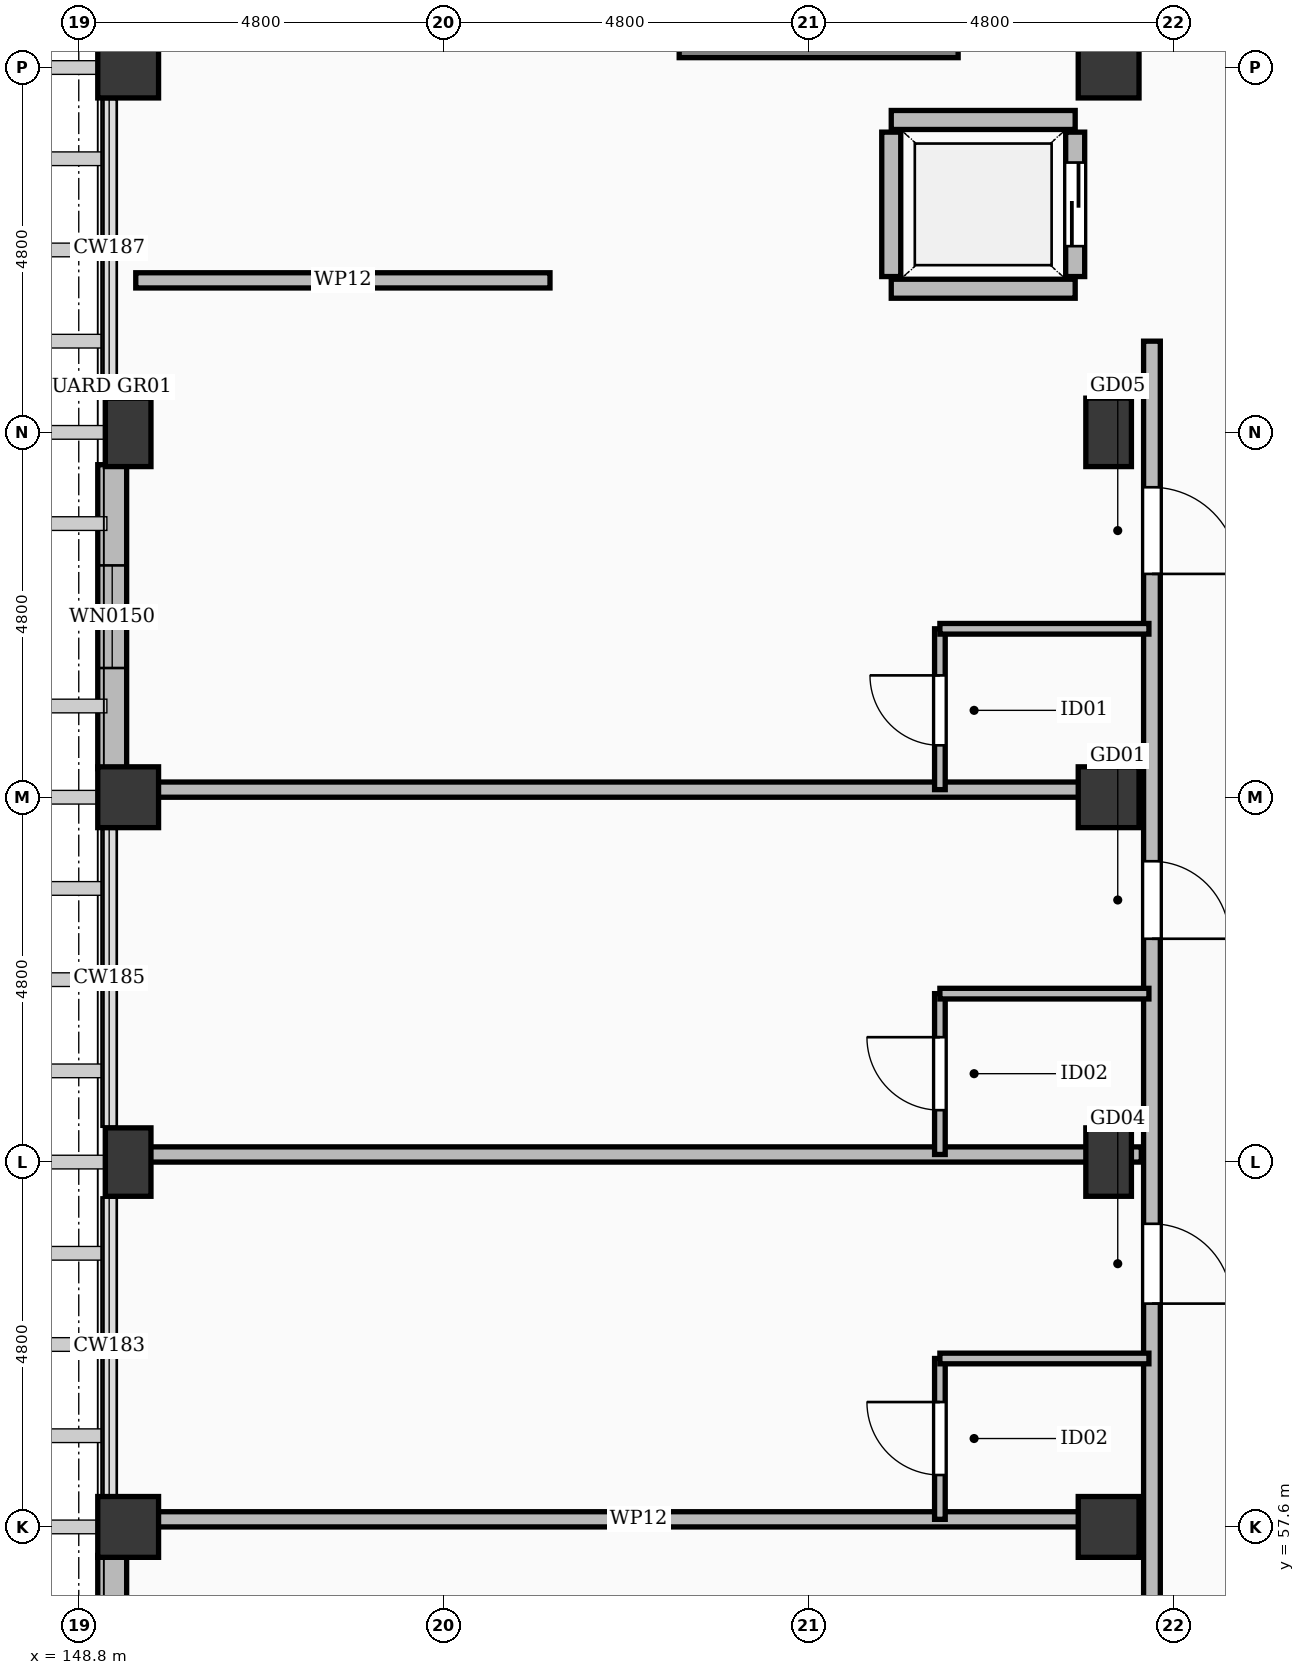
"""IFC4 building model, lengths in metres.
Left out: names, types, materials, properties, quantities, classifications, styles, units other than length and angle.
Written with IfcOpenShell. Run it as: python <this file> out.ifc"""

import sys

from ifc_helpers import new_model, si_unit, direction, frame, frame_2d, origin, origin_2d, place, context, subcontext, project, spatial, rectangle, extrude, element, fill, save


model = new_model("IFC4")
c1 = context("Model", 3, precision=1e-05, world=origin(), true_north=direction((0.0, 1.0)))
c2 = subcontext(c1, "Body", "Model", "MODEL_VIEW")
j1 = project(units=[si_unit("LENGTHUNIT", "METRE"), si_unit("PLANEANGLEUNIT", "RADIAN")], contexts=[c1])
p1 = place(None, origin())
s1 = spatial("IfcSite", under=j1, at=p1, CompositionType="ELEMENT")
p2 = place(p1, origin())
s2 = spatial("IfcBuilding", under=s1, at=p2, CompositionType="ELEMENT")
p3 = place(p2, frame((0.0, 0.0, 21.0)))
s3 = spatial("IfcBuildingStorey", under=s2, at=p3, CompositionType="ELEMENT", Elevation=21.0)
for number, where, z_axis, x_axis in (
    (1, (149.45, 57.6, 0.0), (0.0, 0.0, 1.0), (1.0, 0.0, 0.0)),
    (2, (149.45, 67.2, 0.0), (0.0, 0.0, 1.0), (1.0, 0.0, 0.0)),
    (3, (149.45, 76.8, 0.0), (0.0, 0.0, 1.0), (1.0, 0.0, 0.0)),
    (4, (162.35, 57.6, 0.0), (0.0, 0.0, 1.0), (1.0, 0.0, 0.0)),
    (5, (162.35, 67.2, 0.0), (0.0, 0.0, 1.0), (1.0, 0.0, 0.0)),
    (6, (162.35, 76.8, 0.0), (0.0, 0.0, 1.0), (1.0, 0.0, 0.0)),
):
    element("IfcColumn", number, at=place(p3, frame(where, z_axis=z_axis, x_axis=x_axis)), inside=s3, PredefinedType="COLUMN", context=c2, shape_type="SweptSolid", body=[
        extrude(rectangle(XDim=0.8, YDim=0.8, at=origin_2d()), origin(), (0.0, 0.0, 1.0), 3.6),
    ])
for number, where, z_axis, x_axis in (
    (7, (149.45, 62.4, -0.26), (0.0, 0.0, 1.0), (1.0, 0.0, 0.0)),
    (8, (149.45, 72.0, -0.26), (0.0, 0.0, 1.0), (1.0, 0.0, 0.0)),
    (9, (162.35, 62.4, -0.26), (0.0, 0.0, 1.0), (1.0, 0.0, 0.0)),
    (10, (162.35, 72.0, -0.26), (0.0, 0.0, 1.0), (1.0, 0.0, 0.0)),
):
    element("IfcColumn", number, at=place(p3, frame(where, z_axis=z_axis, x_axis=x_axis)), inside=s3, PredefinedType="COLUMN", context=c2, shape_type="SweptSolid", body=[
        extrude(rectangle(XDim=0.6, YDim=0.9, at=origin_2d()), origin(), (0.0, 0.0, 1.0), 3.86),
    ])
p4 = place(p3, frame((149.24, 53.225, 0.0), z_axis=(0.0, 0.0, 1.0), x_axis=(0.0, 1.0, 0.0)))
e11 = element("IfcWall", 11, at=p4, inside=s3, PredefinedType="SOLIDWALL", context=c2, shape_type="SweptSolid", body=[
    extrude(rectangle(XDim=4.0, YDim=0.38, at=frame_2d((2.0, 0.0))), origin(), (0.0, 0.0, 1.0), 2.652),
])
p5 = place(p4, frame((1.1, 0.0, 0.55)))
e12 = element("IfcOpeningElement", 12, at=p5, cuts=e11, PredefinedType="OPENING", context=c2, shape_type="SweptSolid", body=[
    extrude(rectangle(XDim=1.8, YDim=1.76, at=frame_2d((0.9, 0.88))), frame((0.0, 0.202, 0.0), z_axis=(0.0, -1.0, 0.0), x_axis=(1.0, 0.0, 0.0)), (0.0, 0.0, 1.0), 0.404),
])
p6 = place(p3, frame((149.24, 67.575, 0.0), z_axis=(0.0, 0.0, 1.0), x_axis=(0.0, 1.0, 0.0)))
e13 = element("IfcWall", 13, at=p6, inside=s3, PredefinedType="SOLIDWALL", context=c2, shape_type="SweptSolid", body=[
    extrude(rectangle(XDim=4.0, YDim=0.38, at=frame_2d((2.0, 0.0))), origin(), (0.0, 0.0, 1.0), 2.652),
])
p7 = place(p6, frame((1.325, 0.0, 0.55)))
e14 = element("IfcOpeningElement", 14, at=p7, cuts=e13, PredefinedType="OPENING", context=c2, shape_type="SweptSolid", body=[
    extrude(rectangle(XDim=1.35, YDim=1.73, at=frame_2d((0.675, 0.865))), frame((0.0, 0.202, 0.0), z_axis=(0.0, -1.0, 0.0), x_axis=(1.0, 0.0, 0.0)), (0.0, 0.0, 1.0), 0.404),
])
p8 = place(p3, frame((156.7, 77.18, 0.0), z_axis=(0.0, 0.0, 1.0), x_axis=(1.0, 0.0, 0.0)))
e15 = element("IfcWall", 15, at=p8, inside=s3, PredefinedType="SHEAR", context=c2, shape_type="SweptSolid", body=[
    extrude(rectangle(XDim=3.67, YDim=0.5, at=frame_2d((1.835, 0.0))), origin(), (0.0, 0.0, 1.0), 3.34),
])
for number, where, z_axis, x_axis in (
    (16, (159.49, 73.89, 0.0), (0.0, 0.0, 1.0), (1.0, 0.0, 0.0)),
    (17, (159.49, 76.11, 0.0), (0.0, 0.0, 1.0), (1.0, 0.0, 0.0)),
):
    element("IfcWall", number, at=place(p3, frame(where, z_axis=z_axis, x_axis=x_axis)), inside=s3, PredefinedType="SOLIDWALL", context=c2, shape_type="SweptSolid", body=[
        extrude(rectangle(XDim=2.42, YDim=0.25, at=frame_2d((1.21, 0.0))), origin(), (0.0, 0.0, 1.0), 3.34),
    ])
p9 = place(p3, frame((159.49, 74.05, 0.0), z_axis=(0.0, 0.0, 1.0), x_axis=(0.0, 1.0, 0.0)))
e18 = element("IfcWall", 18, at=p9, inside=s3, PredefinedType="SOLIDWALL", context=c2, shape_type="SweptSolid", body=[
    extrude(rectangle(XDim=1.9, YDim=0.25, at=frame_2d((0.95, 0.0))), origin(), (0.0, 0.0, 1.0), 3.34),
])
p10 = place(p3, frame((161.91, 74.05, 0.0), z_axis=(0.0, 0.0, 1.0), x_axis=(0.0, 1.0, 0.0)))
e19 = element("IfcWall", 19, at=p10, inside=s3, PredefinedType="SOLIDWALL", context=c2, shape_type="SweptSolid", body=[
    extrude(rectangle(XDim=1.9, YDim=0.25, at=frame_2d((0.95, 0.0))), origin(), (0.0, 0.0, 1.0), 3.34),
])
p11 = place(p10, frame((0.4, 0.0, 0.0)))
e20 = element("IfcOpeningElement", 20, at=p11, cuts=e19, PredefinedType="OPENING", context=c2, shape_type="SweptSolid", body=[
    extrude(rectangle(XDim=1.1, YDim=2.2, at=frame_2d((0.55, 1.1))), frame((0.0, 0.137, 0.0), z_axis=(0.0, -1.0, 0.0), x_axis=(1.0, 0.0, 0.0)), (0.0, 0.0, 1.0), 0.274),
])
p12 = place(p3, frame((162.92, 19.55, 0.0), z_axis=(0.0, 0.0, 1.0), x_axis=(0.0, 1.0, 0.0)))
e21 = element("IfcWall", 21, at=p12, inside=s3, PredefinedType="PARTITIONING", context=c2, shape_type="SweptSolid", body=[
    extrude(rectangle(XDim=53.65, YDim=0.22, at=frame_2d((26.825, 0.0))), origin(), (0.0, 0.0, 1.0), 2.652),
])
p13 = place(p12, frame((5.15, 0.0, 0.0)))
e22 = element("IfcOpeningElement", 22, at=p13, cuts=e21, PredefinedType="OPENING", context=c2, shape_type="SweptSolid", body=[
    extrude(rectangle(XDim=1.5, YDim=2.3, at=frame_2d((0.75, 1.15))), frame((0.0, 0.122, 0.0), z_axis=(0.0, -1.0, 0.0), x_axis=(1.0, 0.0, 0.0)), (0.0, 0.0, 1.0), 0.244),
])
p14 = place(p12, frame((12.188, 0.0, 0.0)))
e23 = element("IfcOpeningElement", 23, at=p14, cuts=e21, PredefinedType="OPENING", context=c2, shape_type="SweptSolid", body=[
    extrude(rectangle(XDim=1.05, YDim=2.22, at=frame_2d((0.525, 1.11))), frame((0.0, 0.122, 0.0), z_axis=(0.0, -1.0, 0.0), x_axis=(1.0, 0.0, 0.0)), (0.0, 0.0, 1.0), 0.244),
])
p15 = place(p12, frame((16.988, 0.0, 0.0)))
e24 = element("IfcOpeningElement", 24, at=p15, cuts=e21, PredefinedType="OPENING", context=c2, shape_type="SweptSolid", body=[
    extrude(rectangle(XDim=1.02, YDim=2.2, at=frame_2d((0.51, 1.1))), frame((0.0, 0.122, 0.0), z_axis=(0.0, -1.0, 0.0), x_axis=(1.0, 0.0, 0.0)), (0.0, 0.0, 1.0), 0.244),
])
p16 = place(p12, frame((21.788, 0.0, 0.0)))
e25 = element("IfcOpeningElement", 25, at=p16, cuts=e21, PredefinedType="OPENING", context=c2, shape_type="SweptSolid", body=[
    extrude(rectangle(XDim=1.14, YDim=2.26, at=frame_2d((0.57, 1.13))), frame((0.0, 0.122, 0.0), z_axis=(0.0, -1.0, 0.0), x_axis=(1.0, 0.0, 0.0)), (0.0, 0.0, 1.0), 0.244),
])
p17 = place(p12, frame((26.588, 0.0, 0.0)))
e26 = element("IfcOpeningElement", 26, at=p17, cuts=e21, PredefinedType="OPENING", context=c2, shape_type="SweptSolid", body=[
    extrude(rectangle(XDim=0.98, YDim=2.15, at=frame_2d((0.49, 1.075))), frame((0.0, 0.122, 0.0), z_axis=(0.0, -1.0, 0.0), x_axis=(1.0, 0.0, 0.0)), (0.0, 0.0, 1.0), 0.244),
])
p18 = place(p12, frame((31.038, 0.0, 0.0)))
e27 = element("IfcOpeningElement", 27, at=p18, cuts=e21, PredefinedType="OPENING", context=c2, shape_type="SweptSolid", body=[
    extrude(rectangle(XDim=1.28, YDim=2.16, at=frame_2d((0.64, 1.08))), frame((0.0, 0.122, 0.0), z_axis=(0.0, -1.0, 0.0), x_axis=(1.0, 0.0, 0.0)), (0.0, 0.0, 1.0), 0.244),
])
p19 = place(p12, frame((36.188, 0.0, 0.0)))
e28 = element("IfcOpeningElement", 28, at=p19, cuts=e21, PredefinedType="OPENING", context=c2, shape_type="SweptSolid", body=[
    extrude(rectangle(XDim=0.9, YDim=2.08, at=frame_2d((0.45, 1.04))), frame((0.0, 0.122, 0.0), z_axis=(0.0, -1.0, 0.0), x_axis=(1.0, 0.0, 0.0)), (0.0, 0.0, 1.0), 0.244),
])
p20 = place(p12, frame((40.988, 0.0, 0.0)))
e29 = element("IfcOpeningElement", 29, at=p20, cuts=e21, PredefinedType="OPENING", context=c2, shape_type="SweptSolid", body=[
    extrude(rectangle(XDim=1.05, YDim=2.22, at=frame_2d((0.525, 1.11))), frame((0.0, 0.122, 0.0), z_axis=(0.0, -1.0, 0.0), x_axis=(1.0, 0.0, 0.0)), (0.0, 0.0, 1.0), 0.244),
])
p21 = place(p12, frame((45.788, 0.0, 0.0)))
e30 = element("IfcOpeningElement", 30, at=p21, cuts=e21, PredefinedType="OPENING", context=c2, shape_type="SweptSolid", body=[
    extrude(rectangle(XDim=1.02, YDim=2.2, at=frame_2d((0.51, 1.1))), frame((0.0, 0.122, 0.0), z_axis=(0.0, -1.0, 0.0), x_axis=(1.0, 0.0, 0.0)), (0.0, 0.0, 1.0), 0.244),
])
p22 = place(p12, frame((50.588, 0.0, 0.0)))
e31 = element("IfcOpeningElement", 31, at=p22, cuts=e21, PredefinedType="OPENING", context=c2, shape_type="SweptSolid", body=[
    extrude(rectangle(XDim=1.14, YDim=2.26, at=frame_2d((0.57, 1.13))), frame((0.0, 0.122, 0.0), z_axis=(0.0, -1.0, 0.0), x_axis=(1.0, 0.0, 0.0)), (0.0, 0.0, 1.0), 0.244),
])
p23 = place(p3, frame((149.55, 74.0, 0.0), z_axis=(0.0, 0.0, 1.0), x_axis=(1.0, 0.0, 0.0)))
e32 = element("IfcWall", 32, at=p23, inside=s3, PredefinedType="PARTITIONING", context=c2, shape_type="SweptSolid", body=[
    extrude(rectangle(XDim=5.45, YDim=0.2, at=frame_2d((2.725, 0.0))), origin(), (0.0, 0.0, 1.0), 2.652),
])
p24 = place(p3, frame((149.55, 57.7, 0.0), z_axis=(0.0, 0.0, 1.0), x_axis=(1.0, 0.0, 0.0)))
e33 = element("IfcWall", 33, at=p24, inside=s3, PredefinedType="PARTITIONING", context=c2, shape_type="SweptSolid", body=[
    extrude(rectangle(XDim=13.23, YDim=0.2, at=frame_2d((6.615, 0.0))), origin(), (0.0, 0.0, 1.0), 2.652),
])
p25 = place(p3, frame((160.13, 57.7, 0.0), z_axis=(0.0, 0.0, 1.0), x_axis=(0.0, 1.0, 0.0)))
e34 = element("IfcWall", 34, at=p25, inside=s3, PredefinedType="PARTITIONING", context=c2, shape_type="SweptSolid", body=[
    extrude(rectangle(XDim=2.116, YDim=0.14, at=frame_2d((1.058, 0.0))), origin(), (0.0, 0.0, 1.0), 2.652),
])
p26 = place(p25, frame((0.583, 0.0, 0.0)))
e35 = element("IfcOpeningElement", 35, at=p26, cuts=e34, PredefinedType="OPENING", context=c2, shape_type="SweptSolid", body=[
    extrude(rectangle(XDim=0.96, YDim=2.12, at=frame_2d((0.48, 1.06))), frame((0.0, 0.082, 0.0), z_axis=(0.0, -1.0, 0.0), x_axis=(1.0, 0.0, 0.0)), (0.0, 0.0, 1.0), 0.164),
])
p27 = place(p3, frame((160.13, 59.816, 0.0), z_axis=(0.0, 0.0, 1.0), x_axis=(1.0, 0.0, 0.0)))
e36 = element("IfcWall", 36, at=p27, inside=s3, PredefinedType="PARTITIONING", context=c2, shape_type="SweptSolid", body=[
    extrude(rectangle(XDim=2.75, YDim=0.14, at=frame_2d((1.375, 0.0))), origin(), (0.0, 0.0, 1.0), 2.652),
])
p28 = place(p3, frame((149.55, 62.5, 0.0), z_axis=(0.0, 0.0, 1.0), x_axis=(1.0, 0.0, 0.0)))
e37 = element("IfcWall", 37, at=p28, inside=s3, PredefinedType="PARTITIONING", context=c2, shape_type="SweptSolid", body=[
    extrude(rectangle(XDim=13.23, YDim=0.2, at=frame_2d((6.615, 0.0))), origin(), (0.0, 0.0, 1.0), 2.652),
])
p29 = place(p3, frame((160.13, 62.5, 0.0), z_axis=(0.0, 0.0, 1.0), x_axis=(0.0, 1.0, 0.0)))
e38 = element("IfcWall", 38, at=p29, inside=s3, PredefinedType="PARTITIONING", context=c2, shape_type="SweptSolid", body=[
    extrude(rectangle(XDim=2.116, YDim=0.14, at=frame_2d((1.058, 0.0))), origin(), (0.0, 0.0, 1.0), 2.652),
])
p30 = place(p29, frame((0.583, 0.0, 0.0)))
e39 = element("IfcOpeningElement", 39, at=p30, cuts=e38, PredefinedType="OPENING", context=c2, shape_type="SweptSolid", body=[
    extrude(rectangle(XDim=0.96, YDim=2.12, at=frame_2d((0.48, 1.06))), frame((0.0, 0.082, 0.0), z_axis=(0.0, -1.0, 0.0), x_axis=(1.0, 0.0, 0.0)), (0.0, 0.0, 1.0), 0.164),
])
p31 = place(p3, frame((160.13, 64.616, 0.0), z_axis=(0.0, 0.0, 1.0), x_axis=(1.0, 0.0, 0.0)))
e40 = element("IfcWall", 40, at=p31, inside=s3, PredefinedType="PARTITIONING", context=c2, shape_type="SweptSolid", body=[
    extrude(rectangle(XDim=2.75, YDim=0.14, at=frame_2d((1.375, 0.0))), origin(), (0.0, 0.0, 1.0), 2.652),
])
p32 = place(p3, frame((149.55, 67.3, 0.0), z_axis=(0.0, 0.0, 1.0), x_axis=(1.0, 0.0, 0.0)))
e41 = element("IfcWall", 41, at=p32, inside=s3, PredefinedType="PARTITIONING", context=c2, shape_type="SweptSolid", body=[
    extrude(rectangle(XDim=13.23, YDim=0.2, at=frame_2d((6.615, 0.0))), origin(), (0.0, 0.0, 1.0), 2.652),
])
p33 = place(p3, frame((160.13, 67.3, 0.0), z_axis=(0.0, 0.0, 1.0), x_axis=(0.0, 1.0, 0.0)))
e42 = element("IfcWall", 42, at=p33, inside=s3, PredefinedType="PARTITIONING", context=c2, shape_type="SweptSolid", body=[
    extrude(rectangle(XDim=2.116, YDim=0.14, at=frame_2d((1.058, 0.0))), origin(), (0.0, 0.0, 1.0), 2.652),
])
p34 = place(p33, frame((0.583, 0.0, 0.0)))
e43 = element("IfcOpeningElement", 43, at=p34, cuts=e42, PredefinedType="OPENING", context=c2, shape_type="SweptSolid", body=[
    extrude(rectangle(XDim=0.92, YDim=2.1, at=frame_2d((0.46, 1.05))), frame((0.0, 0.082, 0.0), z_axis=(0.0, -1.0, 0.0), x_axis=(1.0, 0.0, 0.0)), (0.0, 0.0, 1.0), 0.164),
])
p35 = place(p3, frame((160.13, 69.416, 0.0), z_axis=(0.0, 0.0, 1.0), x_axis=(1.0, 0.0, 0.0)))
e44 = element("IfcWall", 44, at=p35, inside=s3, PredefinedType="PARTITIONING", context=c2, shape_type="SweptSolid", body=[
    extrude(rectangle(XDim=2.75, YDim=0.14, at=frame_2d((1.375, 0.0))), origin(), (0.0, 0.0, 1.0), 2.652),
])
p36 = place(p7, origin())
e45 = element("IfcWindow", 45, at=p36, inside=s3, PartitioningType="SINGLE_PANEL", PredefinedType="WINDOW", context=c2, shape_type="SweptSolid", body=[
    extrude(rectangle(XDim=1.35, YDim=1.73, at=frame_2d((0.675, 0.865))), frame((0.0, 0.03, 0.0), z_axis=(0.0, -1.0, 0.0), x_axis=(1.0, 0.0, 0.0)), (0.0, 0.0, 1.0), 0.06),
])
fill(e14, e45)
p37 = place(p11, origin())
e46 = element("IfcDoor", 46, at=p37, inside=s3, OperationType="SLIDING_TO_LEFT", PredefinedType="DOOR", context=c2, shape_type="SweptSolid", body=[
    extrude(rectangle(XDim=1.1, YDim=2.2, at=frame_2d((0.55, 1.1))), frame((0.0, 0.025, 0.0), z_axis=(0.0, -1.0, 0.0), x_axis=(1.0, 0.0, 0.0)), (0.0, 0.0, 1.0), 0.05),
])
fill(e20, e46)
p38 = place(p20, frame((1.05, 0.0, 0.0), z_axis=(0.0, 0.0, 1.0), x_axis=(-1.0, 0.0, 0.0)))
e47 = element("IfcDoor", 47, at=p38, inside=s3, OperationType="SINGLE_SWING_LEFT", PredefinedType="DOOR", context=c2, shape_type="SweptSolid", body=[
    extrude(rectangle(XDim=1.05, YDim=2.22, at=frame_2d((0.525, 1.11))), frame((0.0, 0.025, 0.0), z_axis=(0.0, -1.0, 0.0), x_axis=(1.0, 0.0, 0.0)), (0.0, 0.0, 1.0), 0.05),
])
fill(e29, e47)
p39 = place(p26, origin())
e48 = element("IfcDoor", 48, at=p39, inside=s3, OperationType="SINGLE_SWING_RIGHT", PredefinedType="DOOR", context=c2, shape_type="SweptSolid", body=[
    extrude(rectangle(XDim=0.96, YDim=2.12, at=frame_2d((0.48, 1.06))), frame((0.0, 0.025, 0.0), z_axis=(0.0, -1.0, 0.0), x_axis=(1.0, 0.0, 0.0)), (0.0, 0.0, 1.0), 0.05),
])
fill(e35, e48)
p40 = place(p21, frame((1.02, 0.0, 0.0), z_axis=(0.0, 0.0, 1.0), x_axis=(-1.0, 0.0, 0.0)))
e49 = element("IfcDoor", 49, at=p40, inside=s3, OperationType="SINGLE_SWING_LEFT", PredefinedType="DOOR", context=c2, shape_type="SweptSolid", body=[
    extrude(rectangle(XDim=1.02, YDim=2.2, at=frame_2d((0.51, 1.1))), frame((0.0, 0.025, 0.0), z_axis=(0.0, -1.0, 0.0), x_axis=(1.0, 0.0, 0.0)), (0.0, 0.0, 1.0), 0.05),
])
fill(e30, e49)
p41 = place(p30, origin())
e50 = element("IfcDoor", 50, at=p41, inside=s3, OperationType="SINGLE_SWING_RIGHT", PredefinedType="DOOR", context=c2, shape_type="SweptSolid", body=[
    extrude(rectangle(XDim=0.96, YDim=2.12, at=frame_2d((0.48, 1.06))), frame((0.0, 0.025, 0.0), z_axis=(0.0, -1.0, 0.0), x_axis=(1.0, 0.0, 0.0)), (0.0, 0.0, 1.0), 0.05),
])
fill(e39, e50)
p42 = place(p22, frame((1.14, 0.0, 0.0), z_axis=(0.0, 0.0, 1.0), x_axis=(-1.0, 0.0, 0.0)))
e51 = element("IfcDoor", 51, at=p42, inside=s3, OperationType="SINGLE_SWING_LEFT", PredefinedType="DOOR", context=c2, shape_type="SweptSolid", body=[
    extrude(rectangle(XDim=1.14, YDim=2.26, at=frame_2d((0.57, 1.13))), frame((0.0, 0.025, 0.0), z_axis=(0.0, -1.0, 0.0), x_axis=(1.0, 0.0, 0.0)), (0.0, 0.0, 1.0), 0.05),
])
fill(e31, e51)
p43 = place(p34, origin())
e52 = element("IfcDoor", 52, at=p43, inside=s3, OperationType="SINGLE_SWING_RIGHT", PredefinedType="DOOR", context=c2, shape_type="SweptSolid", body=[
    extrude(rectangle(XDim=0.92, YDim=2.1, at=frame_2d((0.46, 1.05))), frame((0.0, 0.025, 0.0), z_axis=(0.0, -1.0, 0.0), x_axis=(1.0, 0.0, 0.0)), (0.0, 0.0, 1.0), 0.05),
])
fill(e43, e52)
save(model, sys.argv[1])
